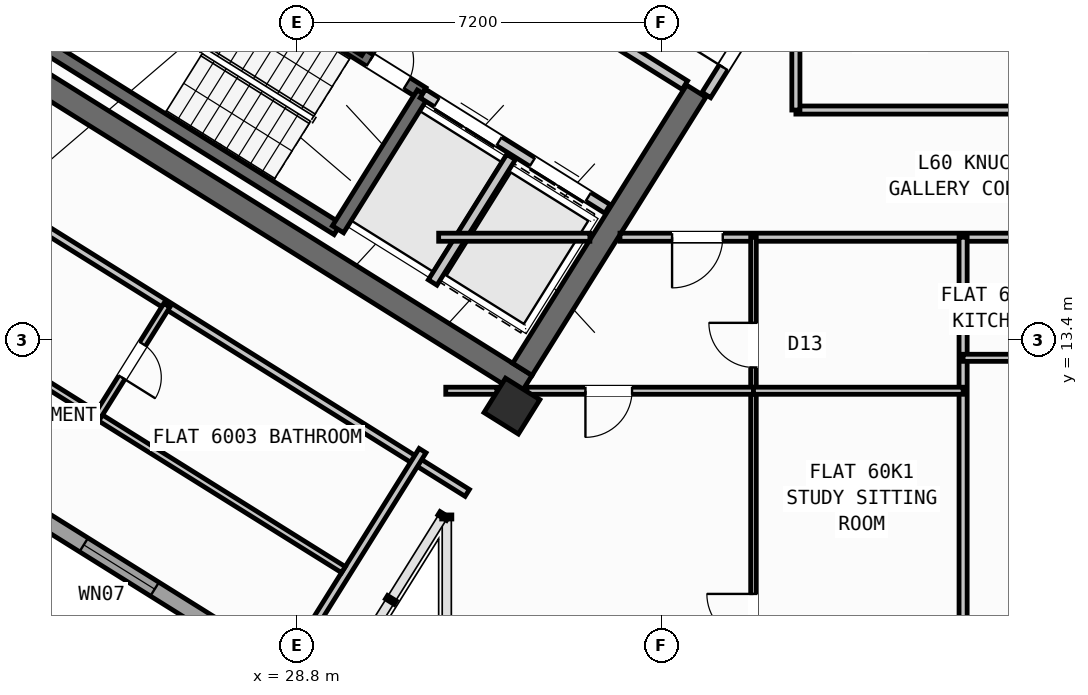
"""IFC4 building model, lengths in metres.
Left out: names, types, materials, properties, quantities, classifications, styles, units other than length and angle.
Written with IfcOpenShell. Run it as: python <this file> out.ifc"""

import sys

from ifc_helpers import new_model, si_unit, direction, frame, frame_2d, origin, origin_2d, place, context, subcontext, project, spatial, rectangle, hollow_rectangle, extrude, source, transform, mapped, element, fill, save


model = new_model("IFC4")
c1 = context("Model", 3, precision=1e-05, world=origin(), true_north=direction((0.0, 1.0)))
c2 = subcontext(c1, "Body", "Model", "MODEL_VIEW")
j1 = project(units=[si_unit("LENGTHUNIT", "METRE"), si_unit("PLANEANGLEUNIT", "RADIAN")], contexts=[c1])
p1 = place(None, origin())
s1 = spatial("IfcSite", under=j1, at=p1, CompositionType="ELEMENT")
p2 = place(p1, origin())
s2 = spatial("IfcBuilding", under=s1, at=p2, CompositionType="ELEMENT")
p3 = place(p2, frame((0.0, 0.0, 238.5)))
s3 = spatial("IfcBuildingStorey", under=s2, at=p3, CompositionType="ELEMENT", Elevation=238.5)
p4 = place(p3, frame((33.324, 12.503, 0.0), z_axis=(0.0, 0.0, 1.0), x_axis=(-0.848043529849, 0.529926571782, 0.0)))
e1 = element("IfcWall", 1, at=p4, inside=s3, PredefinedType="SHEAR", context=c2, shape_type="SweptSolid", body=[
    extrude(rectangle(XDim=13.04, YDim=0.45, at=frame_2d((6.52, 0.0))), origin(), (0.0, 0.0, 1.0), 3.35),
])
p5 = place(p3, frame((36.683, 18.304, 0.0), z_axis=(0.0, 0.0, 1.0), x_axis=(-0.529904039071, -0.848057609704, 0.0)))
e2 = element("IfcWall", 2, at=p5, inside=s3, PredefinedType="SHEAR", context=c2, shape_type="SweptSolid", body=[
    extrude(rectangle(XDim=6.475, YDim=0.45, at=frame_2d((3.238, 0.0))), origin(), (0.0, 0.0, 1.0), 3.35),
])
m1 = source(origin(), c2, "Body", "SweptSolid", [
    extrude(hollow_rectangle(XDim=0.8, YDim=0.8, WallThickness=0.032, at=origin_2d()), origin(), (0.0, 0.0, 1.0), 3.6),
])
p6 = place(p3, frame((33.046, 12.087, 0.0), z_axis=(0.0, 0.0, 1.0), x_axis=(-0.848048096156, 0.529919264233, 0.0)))
e3 = element("IfcColumn", 3, at=p6, inside=s3, PredefinedType="COLUMN", context=c2, shape_type="MappedRepresentation", body=[
    mapped(m1, transform((0.0, 0.0, 0.0), scale=1.0)),
])
p7 = place(p3, frame((29.268, 6.429, 0.0), z_axis=(0.0, 0.0, 1.0), x_axis=(-0.848049971435, 0.529916263149, 0.0)))
e4 = element("IfcWall", 4, at=p7, inside=s3, PredefinedType="STANDARD", context=c2, shape_type="SweptSolid", body=[
    extrude(rectangle(XDim=31.588, YDim=0.32, at=frame_2d((15.794, 0.0))), origin(), (0.0, 0.0, 1.0), 3.35),
])
p8 = place(p7, frame((16.235, 0.0, 0.0)))
e5 = element("IfcOpeningElement", 5, at=p8, cuts=e4, PredefinedType="OPENING", context=c2, shape_type="SweptSolid", body=[
    extrude(rectangle(XDim=1.2, YDim=2.15, at=frame_2d((0.6, 1.075))), frame((0.0, 0.17, 0.0), z_axis=(0.0, -1.0, 0.0), x_axis=(1.0, 0.0, 0.0)), (0.0, 0.0, 1.0), 0.34),
])
p9 = place(p7, frame((3.859, 0.0, 0.9)))
e6 = element("IfcOpeningElement", 6, at=p9, cuts=e4, PredefinedType="OPENING", context=c2, shape_type="SweptSolid", body=[
    extrude(rectangle(XDim=1.65, YDim=1.45, at=frame_2d((0.825, 0.725))), frame((0.0, 0.17, 0.0), z_axis=(0.0, -1.0, 0.0), x_axis=(1.0, 0.0, 0.0)), (0.0, 0.0, 1.0), 0.34),
])
p10 = place(p7, frame((10.519, 0.0, 0.9)))
e7 = element("IfcOpeningElement", 7, at=p10, cuts=e4, PredefinedType="OPENING", context=c2, shape_type="SweptSolid", body=[
    extrude(rectangle(XDim=1.65, YDim=1.45, at=frame_2d((0.825, 0.725))), frame((0.0, 0.17, 0.0), z_axis=(0.0, -1.0, 0.0), x_axis=(1.0, 0.0, 0.0)), (0.0, 0.0, 1.0), 0.34),
])
p11 = place(p7, frame((19.182, 0.0, 1.0)))
e8 = element("IfcOpeningElement", 8, at=p11, cuts=e4, PredefinedType="OPENING", context=c2, shape_type="SweptSolid", body=[
    extrude(rectangle(XDim=0.9, YDim=1.25, at=frame_2d((0.45, 0.625))), frame((0.0, 0.17, 0.0), z_axis=(0.0, -1.0, 0.0), x_axis=(1.0, 0.0, 0.0)), (0.0, 0.0, 1.0), 0.34),
])
p12 = place(p7, frame((22.524, 0.0, 1.0)))
e9 = element("IfcOpeningElement", 9, at=p12, cuts=e4, PredefinedType="OPENING", context=c2, shape_type="SweptSolid", body=[
    extrude(rectangle(XDim=0.9, YDim=1.25, at=frame_2d((0.45, 0.625))), frame((0.0, 0.17, 0.0), z_axis=(0.0, -1.0, 0.0), x_axis=(1.0, 0.0, 0.0)), (0.0, 0.0, 1.0), 0.34),
])
p13 = place(p7, frame((25.658, 0.0, 0.9)))
e10 = element("IfcOpeningElement", 10, at=p13, cuts=e4, PredefinedType="OPENING", context=c2, shape_type="SweptSolid", body=[
    extrude(rectangle(XDim=1.65, YDim=1.45, at=frame_2d((0.825, 0.725))), frame((0.0, 0.17, 0.0), z_axis=(0.0, -1.0, 0.0), x_axis=(1.0, 0.0, 0.0)), (0.0, 0.0, 1.0), 0.34),
])
p14 = place(p7, frame((29.278, 0.0, 0.9)))
e11 = element("IfcOpeningElement", 11, at=p14, cuts=e4, PredefinedType="OPENING", context=c2, shape_type="SweptSolid", body=[
    extrude(rectangle(XDim=1.35, YDim=1.45, at=frame_2d((0.675, 0.725))), frame((0.0, 0.17, 0.0), z_axis=(0.0, -1.0, 0.0), x_axis=(1.0, 0.0, 0.0)), (0.0, 0.0, 1.0), 0.34),
])
p15 = place(p3, frame((29.605, 15.581, 0.0), z_axis=(0.0, 0.0, 1.0), x_axis=(-0.848036911448, 0.529937163087, 0.0)))
e12 = element("IfcWall", 12, at=p15, inside=s3, PredefinedType="SHEAR", context=c2, shape_type="SweptSolid", body=[
    extrude(rectangle(XDim=7.46, YDim=0.26, at=frame_2d((3.73, 0.0))), origin(), (0.0, 0.0, 1.0), 3.35),
])
p16 = place(p3, frame((31.28, 18.261, 0.0), z_axis=(0.0, 0.0, 1.0), x_axis=(-0.848051618787, 0.529913626805, 0.0)))
e13 = element("IfcWall", 13, at=p16, inside=s3, PredefinedType="SHEAR", context=c2, shape_type="SweptSolid", body=[
    extrude(rectangle(XDim=7.46, YDim=0.26, at=frame_2d((3.73, 0.0))), origin(), (0.0, 0.0, 1.0), 3.35),
])
p17 = place(p16, frame((0.36, 0.0, 0.0)))
e14 = element("IfcOpeningElement", 14, at=p17, cuts=e13, PredefinedType="OPENING", context=c2, shape_type="SweptSolid", body=[
    extrude(rectangle(XDim=0.86, YDim=2.05, at=frame_2d((0.43, 1.025))), frame((0.0, 0.14, 0.0), z_axis=(0.0, -1.0, 0.0), x_axis=(1.0, 0.0, 0.0)), (0.0, 0.0, 1.0), 0.28),
])
p18 = place(p3, frame((31.288, 18.256, 0.0), z_axis=(0.0, 0.0, 1.0), x_axis=(-0.529943379326, -0.848033026897, 0.0)))
e15 = element("IfcWall", 15, at=p18, inside=s3, PredefinedType="SHEAR", context=c2, shape_type="SweptSolid", body=[
    extrude(rectangle(XDim=3.16, YDim=0.26, at=frame_2d((1.58, 0.0))), origin(), (0.0, 0.0, 1.0), 3.35),
])
p19 = place(p3, frame((34.933, 15.978, 0.0), z_axis=(0.0, 0.0, 1.0), x_axis=(-0.848055739377, 0.529907032327, 0.0)))
e16 = element("IfcWall", 16, at=p19, inside=s3, PredefinedType="STANDARD", context=c2, shape_type="SweptSolid", body=[
    extrude(rectangle(XDim=4.298, YDim=0.2, at=frame_2d((2.149, 0.0))), origin(), (0.0, 0.0, 1.0), 3.34),
])
p20 = place(p19, frame((0.448, 0.0, 0.0)))
e17 = element("IfcOpeningElement", 17, at=p20, cuts=e16, PredefinedType="OPENING", context=c2, shape_type="SweptSolid", body=[
    extrude(rectangle(XDim=1.3, YDim=2.2, at=frame_2d((0.65, 1.1))), frame((0.0, 0.11, 0.0), z_axis=(0.0, -1.0, 0.0), x_axis=(1.0, 0.0, 0.0)), (0.0, 0.0, 1.0), 0.22),
])
p21 = place(p19, frame((2.523, 0.0, 0.0)))
e18 = element("IfcOpeningElement", 18, at=p21, cuts=e16, PredefinedType="OPENING", context=c2, shape_type="SweptSolid", body=[
    extrude(rectangle(XDim=1.45, YDim=2.25, at=frame_2d((0.725, 1.125))), frame((0.0, 0.11, 0.0), z_axis=(0.0, -1.0, 0.0), x_axis=(1.0, 0.0, 0.0)), (0.0, 0.0, 1.0), 0.22),
])
p22 = place(p3, frame((36.459, 18.421, 0.0), z_axis=(0.0, 0.0, 1.0), x_axis=(-0.848059591691, 0.529900867089, 0.0)))
e19 = element("IfcWall", 19, at=p22, inside=s3, PredefinedType="STANDARD", context=c2, shape_type="SweptSolid", body=[
    extrude(rectangle(XDim=5.818, YDim=0.2, at=frame_2d((2.909, 0.0))), origin(), (0.0, 0.0, 1.0), 3.34),
])
p23 = place(p22, frame((2.598, 0.0, 0.0)))
e20 = element("IfcOpeningElement", 20, at=p23, cuts=e19, PredefinedType="OPENING", context=c2, shape_type="SweptSolid", body=[
    extrude(rectangle(XDim=1.15, YDim=2.1, at=frame_2d((0.575, 1.05))), frame((0.0, 0.11, 0.0), z_axis=(0.0, -1.0, 0.0), x_axis=(1.0, 0.0, 0.0)), (0.0, 0.0, 1.0), 0.22),
])
p24 = place(p3, frame((33.029, 17.003, 0.0), z_axis=(0.0, 0.0, 1.0), x_axis=(-0.529916267533, -0.848049968695, 0.0)))
e21 = element("IfcWall", 21, at=p24, inside=s3, PredefinedType="STANDARD", context=c2, shape_type="SweptSolid", body=[
    extrude(rectangle(XDim=2.92, YDim=0.2, at=frame_2d((1.46, 0.0))), origin(), (0.0, 0.0, 1.0), 3.34),
])
p25 = place(p3, frame((31.525, 21.504, 0.0), z_axis=(0.0, 0.0, 1.0), x_axis=(-0.529907497854, -0.848055448493, 0.0)))
e22 = element("IfcWall", 22, at=p25, inside=s3, PredefinedType="STANDARD", context=c2, shape_type="SweptSolid", body=[
    extrude(rectangle(XDim=2.88, YDim=0.2, at=frame_2d((1.44, 0.0))), origin(), (0.0, 0.0, 1.0), 3.34),
])
p26 = place(p3, frame((32.164, 10.374, 0.0), z_axis=(0.0, 0.0, 1.0), x_axis=(-0.848044107957, 0.529925646633, 0.0)))
e23 = element("IfcWall", 23, at=p26, inside=s3, PredefinedType="PARTITIONING", context=c2, shape_type="SweptSolid", body=[
    extrude(rectangle(XDim=15.57, YDim=0.16, at=frame_2d((7.785, 0.0))), origin(), (0.0, 0.0, 1.0), 3.34),
])
p27 = place(p26, frame((10.83, 0.0, 0.0)))
e24 = element("IfcOpeningElement", 24, at=p27, cuts=e23, PredefinedType="OPENING", context=c2, shape_type="SweptSolid", body=[
    extrude(rectangle(XDim=1.0, YDim=2.1, at=frame_2d((0.5, 1.05))), frame((0.0, 0.09, 0.0), z_axis=(0.0, -1.0, 0.0), x_axis=(1.0, 0.0, 0.0)), (0.0, 0.0, 1.0), 0.18),
])
p28 = place(p3, frame((31.282, 11.208, 0.0), z_axis=(0.0, 0.0, 1.0), x_axis=(-0.529938869374, -0.84803584519, 0.0)))
e25 = element("IfcWall", 25, at=p28, inside=s3, PredefinedType="PARTITIONING", context=c2, shape_type="SweptSolid", body=[
    extrude(rectangle(XDim=5.48, YDim=0.16, at=frame_2d((2.74, 0.0))), origin(), (0.0, 0.0, 1.0), 3.34),
])
p29 = place(p3, frame((29.72, 8.859, 0.0), z_axis=(0.0, 0.0, 1.0), x_axis=(-0.848049134363, 0.529917602752, 0.0)))
e26 = element("IfcWall", 26, at=p29, inside=s3, PredefinedType="PLUMBINGWALL", context=c2, shape_type="SweptSolid", body=[
    extrude(rectangle(XDim=14.3, YDim=0.14, at=frame_2d((7.15, 0.0))), origin(), (0.0, 0.0, 1.0), 3.34),
])
p30 = place(p29, frame((9.57, 0.0, 0.0)))
e27 = element("IfcOpeningElement", 27, at=p30, cuts=e26, PredefinedType="OPENING", context=c2, shape_type="SweptSolid", body=[
    extrude(rectangle(XDim=0.92, YDim=2.08, at=frame_2d((0.46, 1.04))), frame((0.0, 0.08, 0.0), z_axis=(0.0, -1.0, 0.0), x_axis=(1.0, 0.0, 0.0)), (0.0, 0.0, 1.0), 0.16),
])
p31 = place(p3, frame((26.237, 14.078, 0.0), z_axis=(0.0, 0.0, 1.0), x_axis=(-0.52995640672, -0.848024885824, 0.0)))
e28 = element("IfcWall", 28, at=p31, inside=s3, PredefinedType="PLUMBINGWALL", context=c2, shape_type="SweptSolid", body=[
    extrude(rectangle(XDim=2.58, YDim=0.14, at=frame_2d((1.29, 0.0))), origin(), (0.0, 0.0, 1.0), 3.34),
])
p32 = place(p31, frame((0.9, 0.0, 0.0)))
e29 = element("IfcOpeningElement", 29, at=p32, cuts=e28, PredefinedType="OPENING", context=c2, shape_type="SweptSolid", body=[
    extrude(rectangle(XDim=0.78, YDim=2.05, at=frame_2d((0.39, 1.025))), frame((0.0, 0.08, 0.0), z_axis=(0.0, -1.0, 0.0), x_axis=(1.0, 0.0, 0.0)), (0.0, 0.0, 1.0), 0.16),
])
p33 = place(p3, frame((38.451, 20.737, 0.0), z_axis=(0.0, 0.0, 1.0), x_axis=(-0.529924799939, -0.848044637038, 0.0)))
e30 = element("IfcWall", 30, at=p33, inside=s3, PredefinedType="STANDARD", context=c2, shape_type="SweptSolid", body=[
    extrude(rectangle(XDim=2.96, YDim=0.2, at=frame_2d((1.48, 0.0))), origin(), (0.0, 0.0, 1.0), 3.34),
])
p34 = place(p33, frame((1.46, 0.0, 0.0)))
e31 = element("IfcOpeningElement", 31, at=p34, cuts=e30, PredefinedType="OPENING", context=c2, shape_type="SweptSolid", body=[
    extrude(rectangle(XDim=0.86, YDim=2.05, at=frame_2d((0.43, 1.025))), frame((0.0, 0.11, 0.0), z_axis=(0.0, -1.0, 0.0), x_axis=(1.0, 0.0, 0.0)), (0.0, 0.0, 1.0), 0.22),
])
p35 = place(p3, frame((31.6, 15.42, 0.0), z_axis=(0.0, 0.0, 1.0), x_axis=(1.0, 0.0, 0.0)))
e32 = element("IfcWall", 32, at=p35, inside=s3, PredefinedType="PARTITIONING", context=c2, shape_type="SweptSolid", body=[
    extrude(rectangle(XDim=2.984, YDim=0.16, at=frame_2d((1.492, 0.0))), origin(), (0.0, 0.0, 1.0), 3.34),
])
p36 = place(p3, frame((35.178, 15.42, 0.0), z_axis=(0.0, 0.0, 1.0), x_axis=(1.0, 0.0, 0.0)))
e33 = element("IfcWall", 33, at=p36, inside=s3, PredefinedType="PARTITIONING", context=c2, shape_type="SweptSolid", body=[
    extrude(rectangle(XDim=15.552, YDim=0.16, at=frame_2d((7.776, 0.0))), origin(), (0.0, 0.0, 1.0), 3.34),
])
p37 = place(p36, frame((1.028, 0.0, 0.0)))
e34 = element("IfcOpeningElement", 34, at=p37, cuts=e33, PredefinedType="OPENING", context=c2, shape_type="SweptSolid", body=[
    extrude(rectangle(XDim=1.0, YDim=2.1, at=frame_2d((0.5, 1.05))), frame((0.0, 0.09, 0.0), z_axis=(0.0, -1.0, 0.0), x_axis=(1.0, 0.0, 0.0)), (0.0, 0.0, 1.0), 0.18),
])
p38 = place(p36, frame((8.858, 0.0, 0.0)))
e35 = element("IfcOpeningElement", 35, at=p38, cuts=e33, PredefinedType="OPENING", context=c2, shape_type="SweptSolid", body=[
    extrude(rectangle(XDim=1.0, YDim=2.1, at=frame_2d((0.5, 1.05))), frame((0.0, 0.09, 0.0), z_axis=(0.0, -1.0, 0.0), x_axis=(1.0, 0.0, 0.0)), (0.0, 0.0, 1.0), 0.18),
])
p39 = place(p3, frame((38.65, 17.93, 0.0), z_axis=(0.0, 0.0, 1.0), x_axis=(1.0, 0.0, 0.0)))
e36 = element("IfcWall", 36, at=p39, inside=s3, PredefinedType="PARTITIONING", context=c2, shape_type="SweptSolid", body=[
    extrude(rectangle(XDim=9.95, YDim=0.16, at=frame_2d((4.975, 0.0))), origin(), (0.0, 0.0, 1.0), 3.34),
])
p40 = place(p39, frame((4.475, 0.0, 0.0)))
e37 = element("IfcOpeningElement", 37, at=p40, cuts=e36, PredefinedType="OPENING", context=c2, shape_type="SweptSolid", body=[
    extrude(rectangle(XDim=1.0, YDim=2.1, at=frame_2d((0.5, 1.05))), frame((0.0, 0.09, 0.0), z_axis=(0.0, -1.0, 0.0), x_axis=(1.0, 0.0, 0.0)), (0.0, 0.0, 1.0), 0.18),
])
p41 = place(p3, frame((38.65, 17.93, 0.0), z_axis=(0.0, 0.0, 1.0), x_axis=(0.0, 1.0, 0.0)))
e38 = element("IfcWall", 38, at=p41, inside=s3, PredefinedType="PARTITIONING", context=c2, shape_type="SweptSolid", body=[
    extrude(rectangle(XDim=3.046, YDim=0.16, at=frame_2d((1.523, 0.0))), origin(), (0.0, 0.0, 1.0), 3.34),
])
p42 = place(p3, frame((41.95, 1.96, 0.0), z_axis=(0.0, 0.0, 1.0), x_axis=(0.0, 1.0, 0.0)))
e39 = element("IfcWall", 39, at=p42, inside=s3, PredefinedType="PARTITIONING", context=c2, shape_type="SweptSolid", body=[
    extrude(rectangle(XDim=13.46, YDim=0.16, at=frame_2d((6.73, 0.0))), origin(), (0.0, 0.0, 1.0), 3.34),
])
p43 = place(p3, frame((37.813, 1.96, 0.0), z_axis=(0.0, 0.0, 1.0), x_axis=(0.0, 1.0, 0.0)))
e40 = element("IfcWall", 40, at=p43, inside=s3, PredefinedType="PARTITIONING", context=c2, shape_type="SweptSolid", body=[
    extrude(rectangle(XDim=13.46, YDim=0.11, at=frame_2d((6.73, 0.0))), origin(), (0.0, 0.0, 1.0), 3.34),
])
p44 = place(p43, frame((5.5, 0.0, 0.0)))
e41 = element("IfcOpeningElement", 41, at=p44, cuts=e40, PredefinedType="OPENING", context=c2, shape_type="SweptSolid", body=[
    extrude(rectangle(XDim=0.92, YDim=2.08, at=frame_2d((0.46, 1.04))), frame((0.0, 0.065, 0.0), z_axis=(0.0, -1.0, 0.0), x_axis=(1.0, 0.0, 0.0)), (0.0, 0.0, 1.0), 0.13),
])
p45 = place(p43, frame((10.89, 0.0, 0.0)))
e42 = element("IfcOpeningElement", 42, at=p45, cuts=e40, PredefinedType="OPENING", context=c2, shape_type="SweptSolid", body=[
    extrude(rectangle(XDim=0.88, YDim=2.08, at=frame_2d((0.44, 1.04))), frame((0.0, 0.065, 0.0), z_axis=(0.0, -1.0, 0.0), x_axis=(1.0, 0.0, 0.0)), (0.0, 0.0, 1.0), 0.13),
])
p46 = place(p3, frame((31.74, 12.39, 0.0), z_axis=(0.0, 0.0, 1.0), x_axis=(1.0, 0.0, 0.0)))
e43 = element("IfcWall", 43, at=p46, inside=s3, PredefinedType="PLUMBINGWALL", context=c2, shape_type="SweptSolid", body=[
    extrude(rectangle(XDim=1.01, YDim=0.14, at=frame_2d((0.505, 0.0))), origin(), (0.0, 0.0, 1.0), 3.34),
])
p47 = place(p3, frame((33.339, 12.39, 0.0), z_axis=(0.0, 0.0, 1.0), x_axis=(1.0, 0.0, 0.0)))
e44 = element("IfcWall", 44, at=p47, inside=s3, PredefinedType="PLUMBINGWALL", context=c2, shape_type="SweptSolid", body=[
    extrude(rectangle(XDim=4.474, YDim=0.14, at=frame_2d((2.237, 0.0))), origin(), (0.0, 0.0, 1.0), 2.525),
])
p48 = place(p47, frame((1.158, 0.0, 0.0)))
e45 = element("IfcOpeningElement", 45, at=p48, cuts=e44, PredefinedType="OPENING", context=c2, shape_type="SweptSolid", body=[
    extrude(rectangle(XDim=0.92, YDim=2.08, at=frame_2d((0.46, 1.04))), frame((0.0, 0.08, 0.0), z_axis=(0.0, -1.0, 0.0), x_axis=(1.0, 0.0, 0.0)), (0.0, 0.0, 1.0), 0.16),
])
p49 = place(p3, frame((37.813, 12.39, 0.0), z_axis=(0.0, 0.0, 1.0), x_axis=(1.0, 0.0, 0.0)))
e46 = element("IfcWall", 46, at=p49, inside=s3, PredefinedType="PLUMBINGWALL", context=c2, shape_type="SweptSolid", body=[
    extrude(rectangle(XDim=4.137, YDim=0.14, at=frame_2d((2.068, 0.0))), origin(), (0.0, 0.0, 1.0), 2.525),
])
p50 = place(p3, frame((41.95, 13.04, 0.0), z_axis=(0.0, 0.0, 1.0), x_axis=(1.0, 0.0, 0.0)))
e47 = element("IfcWall", 47, at=p50, inside=s3, PredefinedType="PLUMBINGWALL", context=c2, shape_type="SweptSolid", body=[
    extrude(rectangle(XDim=5.122, YDim=0.14, at=frame_2d((2.561, 0.0))), origin(), (0.0, 0.0, 1.0), 3.34),
])
p51 = place(p50, frame((2.101, 0.0, 0.0)))
e48 = element("IfcOpeningElement", 48, at=p51, cuts=e47, PredefinedType="OPENING", context=c2, shape_type="SweptSolid", body=[
    extrude(rectangle(XDim=0.92, YDim=2.08, at=frame_2d((0.46, 1.04))), frame((0.0, 0.08, 0.0), z_axis=(0.0, -1.0, 0.0), x_axis=(1.0, 0.0, 0.0)), (0.0, 0.0, 1.0), 0.16),
])
m2 = source(origin(), c2, "Body", "SweptSolid", [
    extrude(rectangle(XDim=1.65, YDim=1.45, at=frame_2d((0.825, 0.725))), frame((0.0, 0.03, 0.0), z_axis=(0.0, -1.0, 0.0), x_axis=(1.0, 0.0, 0.0)), (0.0, 0.0, 1.0), 0.06),
])
p52 = place(p9, origin())
e49 = element("IfcWindow", 49, at=p52, inside=s3, PartitioningType="SINGLE_PANEL", PredefinedType="WINDOW", context=c2, shape_type="MappedRepresentation", body=[
    mapped(m2, transform((0.0, 0.0, 0.0), scale=1.0)),
])
fill(e6, e49)
m3 = source(origin(), c2, "Body", "SweptSolid", [
    extrude(rectangle(XDim=0.86, YDim=2.05, at=frame_2d((0.43, 1.025))), frame((0.0, 0.025, 0.0), z_axis=(0.0, -1.0, 0.0), x_axis=(1.0, 0.0, 0.0)), (0.0, 0.0, 1.0), 0.05),
])
p53 = place(p17, frame((0.86, 0.0, 0.0), z_axis=(0.0, 0.0, 1.0), x_axis=(-1.0, 0.0, 0.0)))
e50 = element("IfcDoor", 50, at=p53, inside=s3, OperationType="SINGLE_SWING_LEFT", PredefinedType="DOOR", context=c2, shape_type="MappedRepresentation", body=[
    mapped(m3, transform((0.0, 0.0, 0.0), scale=1.0)),
])
fill(e14, e50)
m4 = source(origin(), c2, "Body", "SweptSolid", [
    extrude(rectangle(XDim=1.3, YDim=2.2, at=frame_2d((0.65, 1.1))), frame((0.0, 0.025, 0.0), z_axis=(0.0, -1.0, 0.0), x_axis=(1.0, 0.0, 0.0)), (0.0, 0.0, 1.0), 0.05),
])
p54 = place(p20, origin())
e51 = element("IfcDoor", 51, at=p54, inside=s3, OperationType="DOUBLE_DOOR_SLIDING", PredefinedType="DOOR", context=c2, shape_type="MappedRepresentation", body=[
    mapped(m4, transform((0.0, 0.0, 0.0), scale=1.0)),
])
fill(e17, e51)
m5 = source(origin(), c2, "Body", "SweptSolid", [
    extrude(rectangle(XDim=1.45, YDim=2.25, at=frame_2d((0.725, 1.125))), frame((0.0, 0.025, 0.0), z_axis=(0.0, -1.0, 0.0), x_axis=(1.0, 0.0, 0.0)), (0.0, 0.0, 1.0), 0.05),
])
p55 = place(p21, origin())
e52 = element("IfcDoor", 52, at=p55, inside=s3, OperationType="DOUBLE_DOOR_SLIDING", PredefinedType="DOOR", context=c2, shape_type="MappedRepresentation", body=[
    mapped(m5, transform((0.0, 0.0, 0.0), scale=1.0)),
])
fill(e18, e52)
m6 = source(origin(), c2, "Body", "SweptSolid", [
    extrude(rectangle(XDim=0.78, YDim=2.05, at=frame_2d((0.39, 1.025))), frame((0.0, 0.025, 0.0), z_axis=(0.0, -1.0, 0.0), x_axis=(1.0, 0.0, 0.0)), (0.0, 0.0, 1.0), 0.05),
])
p56 = place(p32, origin())
e53 = element("IfcDoor", 53, at=p56, inside=s3, OperationType="SINGLE_SWING_RIGHT", PredefinedType="DOOR", context=c2, shape_type="MappedRepresentation", body=[
    mapped(m6, transform((0.0, 0.0, 0.0), scale=1.0)),
])
fill(e29, e53)
p57 = place(p34, frame((0.86, 0.0, 0.0), z_axis=(0.0, 0.0, 1.0), x_axis=(-1.0, 0.0, 0.0)))
e54 = element("IfcDoor", 54, at=p57, inside=s3, OperationType="SINGLE_SWING_LEFT", PredefinedType="DOOR", context=c2, shape_type="MappedRepresentation", body=[
    mapped(m3, transform((0.0, 0.0, 0.0), scale=1.0)),
])
fill(e31, e54)
m7 = source(origin(), c2, "Body", "SweptSolid", [
    extrude(rectangle(XDim=0.92, YDim=2.08, at=frame_2d((0.46, 1.04))), frame((0.0, 0.025, 0.0), z_axis=(0.0, -1.0, 0.0), x_axis=(1.0, 0.0, 0.0)), (0.0, 0.0, 1.0), 0.05),
])
p58 = place(p44, origin())
e55 = element("IfcDoor", 55, at=p58, inside=s3, OperationType="SINGLE_SWING_RIGHT", PredefinedType="DOOR", context=c2, shape_type="MappedRepresentation", body=[
    mapped(m7, transform((0.0, 0.0, 0.0), scale=1.0)),
])
fill(e41, e55)
m8 = source(origin(), c2, "Body", "SweptSolid", [
    extrude(rectangle(XDim=1.0, YDim=2.1, at=frame_2d((0.5, 1.05))), frame((0.0, 0.025, 0.0), z_axis=(0.0, -1.0, 0.0), x_axis=(1.0, 0.0, 0.0)), (0.0, 0.0, 1.0), 0.05),
])
p59 = place(p37, frame((1.0, 0.0, 0.0), z_axis=(0.0, 0.0, 1.0), x_axis=(-1.0, 0.0, 0.0)))
e56 = element("IfcDoor", 56, at=p59, inside=s3, OperationType="SINGLE_SWING_RIGHT", PredefinedType="DOOR", context=c2, shape_type="MappedRepresentation", body=[
    mapped(m8, transform((0.0, 0.0, 0.0), scale=1.0)),
])
fill(e34, e56)
p60 = place(p48, frame((0.92, 0.0, 0.0), z_axis=(0.0, 0.0, 1.0), x_axis=(-1.0, 0.0, 0.0)))
e57 = element("IfcDoor", 57, at=p60, inside=s3, OperationType="SINGLE_SWING_RIGHT", PredefinedType="DOOR", context=c2, shape_type="MappedRepresentation", body=[
    mapped(m7, transform((0.0, 0.0, 0.0), scale=1.0)),
])
fill(e45, e57)
m9 = source(origin(), c2, "Body", "SweptSolid", [
    extrude(rectangle(XDim=0.88, YDim=2.08, at=frame_2d((0.44, 1.04))), frame((0.0, 0.025, 0.0), z_axis=(0.0, -1.0, 0.0), x_axis=(1.0, 0.0, 0.0)), (0.0, 0.0, 1.0), 0.05),
])
p61 = place(p45, origin())
e58 = element("IfcDoor", 58, at=p61, inside=s3, OperationType="SINGLE_SWING_RIGHT", PredefinedType="DOOR", context=c2, shape_type="MappedRepresentation", body=[
    mapped(m9, transform((0.0, 0.0, 0.0), scale=1.0)),
])
fill(e42, e58)
save(model, sys.argv[1])
